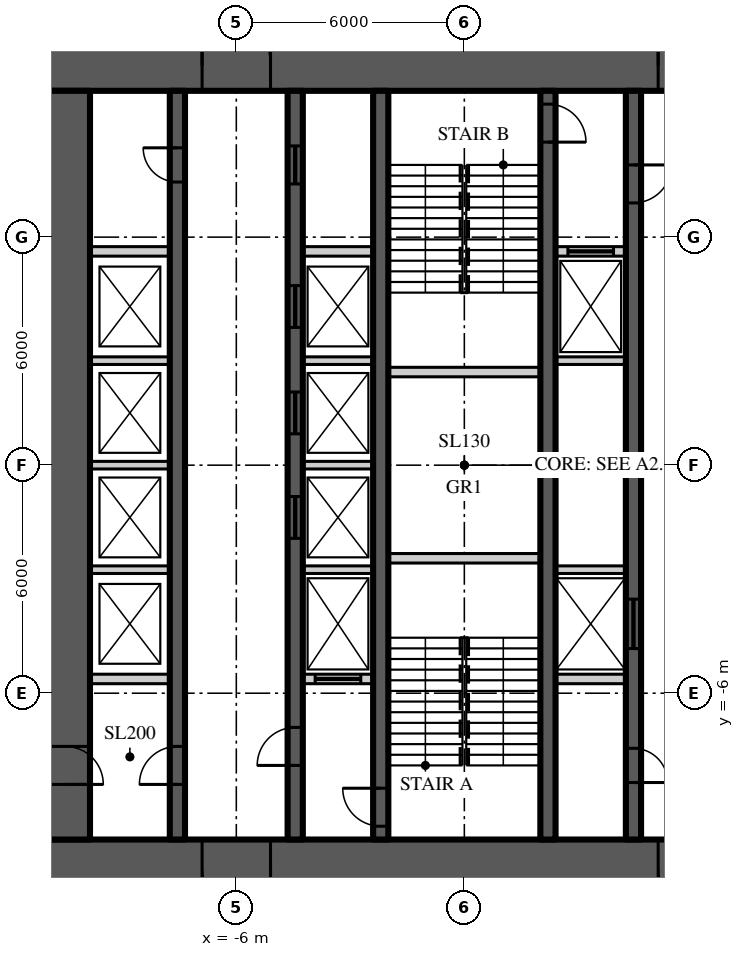
"""IFC4 building model, lengths in metres.
Left out: names, types, materials, properties, quantities, classifications, styles, units other than length and angle.
Written with IfcOpenShell. Run it as: python <this file> out.ifc"""

import sys

from ifc_helpers import new_model, si_unit, direction, frame, frame_2d, origin, place, context, subcontext, project, spatial, rectangle, extrude, element, fill, save


model = new_model("IFC4")
c1 = context("Model", 3, precision=1e-05, world=origin(), true_north=direction((0.0, 1.0)))
c2 = subcontext(c1, "Body", "Model", "MODEL_VIEW")
j1 = project(units=[si_unit("LENGTHUNIT", "METRE"), si_unit("PLANEANGLEUNIT", "RADIAN")], contexts=[c1])
p1 = place(None, origin())
s1 = spatial("IfcSite", under=j1, at=p1, CompositionType="ELEMENT")
p2 = place(p1, origin())
s2 = spatial("IfcBuilding", under=s1, at=p2, CompositionType="ELEMENT")
p3 = place(p2, frame((0.0, 0.0, 113.7)))
s3 = spatial("IfcBuildingStorey", under=s2, at=p3, CompositionType="ELEMENT", Elevation=113.7)
p4 = place(p3, frame((-11.15, 10.5, 0.0), z_axis=(0.0, 0.0, 1.0), x_axis=(1.0, 0.0, 0.0)))
e1 = element("IfcWall", 1, at=p4, inside=s3, PredefinedType="SHEAR", context=c2, shape_type="SweptSolid", body=[
    extrude(rectangle(XDim=22.3, YDim=1.3, at=frame_2d((11.15, 0.0))), origin(), (0.0, 0.0, 1.0), 4.5),
])
p5 = place(p4, frame((4.25, 0.0, 0.0)))
e2 = element("IfcOpeningElement", 2, at=p5, cuts=e1, PredefinedType="OPENING", context=c2, shape_type="SweptSolid", body=[
    extrude(rectangle(XDim=1.8, YDim=2.2, at=frame_2d((0.9, 1.1))), frame((0.0, 0.66, 0.0), z_axis=(0.0, -1.0, 0.0), x_axis=(1.0, 0.0, 0.0)), (0.0, 0.0, 1.0), 1.32),
])
p6 = place(p4, frame((16.25, 0.0, 0.0)))
e3 = element("IfcOpeningElement", 3, at=p6, cuts=e1, PredefinedType="OPENING", context=c2, shape_type="SweptSolid", body=[
    extrude(rectangle(XDim=1.8, YDim=2.2, at=frame_2d((0.9, 1.1))), frame((0.0, 0.66, 0.0), z_axis=(0.0, -1.0, 0.0), x_axis=(1.0, 0.0, 0.0)), (0.0, 0.0, 1.0), 1.32),
])
p7 = place(p3, frame((11.15, -10.5, 0.0), z_axis=(0.0, 0.0, 1.0), x_axis=(-1.0, 0.0, 0.0)))
e4 = element("IfcWall", 4, at=p7, inside=s3, PredefinedType="SHEAR", context=c2, shape_type="SweptSolid", body=[
    extrude(rectangle(XDim=22.3, YDim=1.3, at=frame_2d((11.15, 0.0))), origin(), (0.0, 0.0, 1.0), 4.5),
])
p8 = place(p7, frame((16.25, 0.0, 0.0)))
e5 = element("IfcOpeningElement", 5, at=p8, cuts=e4, PredefinedType="OPENING", context=c2, shape_type="SweptSolid", body=[
    extrude(rectangle(XDim=1.8, YDim=2.2, at=frame_2d((0.9, 1.1))), frame((0.0, 0.66, 0.0), z_axis=(0.0, -1.0, 0.0), x_axis=(1.0, 0.0, 0.0)), (0.0, 0.0, 1.0), 1.32),
])
p9 = place(p7, frame((4.25, 0.0, 0.0)))
e6 = element("IfcOpeningElement", 6, at=p9, cuts=e4, PredefinedType="OPENING", context=c2, shape_type="SweptSolid", body=[
    extrude(rectangle(XDim=1.8, YDim=2.2, at=frame_2d((0.9, 1.1))), frame((0.0, 0.66, 0.0), z_axis=(0.0, -1.0, 0.0), x_axis=(1.0, 0.0, 0.0)), (0.0, 0.0, 1.0), 1.32),
])
p10 = place(p3, frame((-10.5, 9.85, 0.0), z_axis=(0.0, 0.0, 1.0), x_axis=(0.0, -1.0, 0.0)))
e7 = element("IfcWall", 7, at=p10, inside=s3, PredefinedType="SHEAR", context=c2, shape_type="SweptSolid", body=[
    extrude(rectangle(XDim=19.7, YDim=1.3, at=frame_2d((9.85, 0.0))), origin(), (0.0, 0.0, 1.0), 4.5),
])
p11 = place(p10, frame((17.25, 0.0, 0.0)))
e8 = element("IfcOpeningElement", 8, at=p11, cuts=e7, PredefinedType="OPENING", context=c2, shape_type="SweptSolid", body=[
    extrude(rectangle(XDim=1.0, YDim=2.2, at=frame_2d((0.5, 1.1))), frame((0.0, 0.66, 0.0), z_axis=(0.0, -1.0, 0.0), x_axis=(1.0, 0.0, 0.0)), (0.0, 0.0, 1.0), 1.32),
])
p12 = place(p3, frame((-7.55, -9.85, 0.0), z_axis=(0.0, 0.0, 1.0), x_axis=(0.0, 1.0, 0.0)))
e9 = element("IfcWall", 9, at=p12, inside=s3, PredefinedType="SHEAR", context=c2, shape_type="SweptSolid", body=[
    extrude(rectangle(XDim=19.7, YDim=0.4, at=frame_2d((9.85, 0.0))), origin(), (0.0, 0.0, 1.0), 4.5),
])
p13 = place(p12, frame((1.45, 0.0, 0.0)))
e10 = element("IfcOpeningElement", 10, at=p13, cuts=e9, PredefinedType="OPENING", context=c2, shape_type="SweptSolid", body=[
    extrude(rectangle(XDim=1.0, YDim=2.2, at=frame_2d((0.5, 1.1))), frame((0.0, 0.21, 0.0), z_axis=(0.0, -1.0, 0.0), x_axis=(1.0, 0.0, 0.0)), (0.0, 0.0, 1.0), 0.42),
])
p14 = place(p12, frame((17.3, 0.0, 0.0)))
e11 = element("IfcOpeningElement", 11, at=p14, cuts=e9, PredefinedType="OPENING", context=c2, shape_type="SweptSolid", body=[
    extrude(rectangle(XDim=0.9, YDim=2.1, at=frame_2d((0.45, 1.05))), frame((0.0, 0.21, 0.0), z_axis=(0.0, -1.0, 0.0), x_axis=(1.0, 0.0, 0.0)), (0.0, 0.0, 1.0), 0.42),
])
p15 = place(p3, frame((-4.45, -9.85, 0.0), z_axis=(0.0, 0.0, 1.0), x_axis=(0.0, 1.0, 0.0)))
e12 = element("IfcWall", 12, at=p15, inside=s3, PredefinedType="SHEAR", context=c2, shape_type="SweptSolid", body=[
    extrude(rectangle(XDim=19.7, YDim=0.4, at=frame_2d((9.85, 0.0))), origin(), (0.0, 0.0, 1.0), 4.5),
])
p16 = place(p15, frame((1.95, 0.0, 0.0)))
e13 = element("IfcOpeningElement", 13, at=p16, cuts=e12, PredefinedType="OPENING", context=c2, shape_type="SweptSolid", body=[
    extrude(rectangle(XDim=1.0, YDim=2.2, at=frame_2d((0.5, 1.1))), frame((0.0, 0.21, 0.0), z_axis=(0.0, -1.0, 0.0), x_axis=(1.0, 0.0, 0.0)), (0.0, 0.0, 1.0), 0.42),
])
p17 = place(p15, frame((17.25, 0.0, 0.0)))
e14 = element("IfcOpeningElement", 14, at=p17, cuts=e12, PredefinedType="OPENING", context=c2, shape_type="SweptSolid", body=[
    extrude(rectangle(XDim=1.0, YDim=2.1, at=frame_2d((0.5, 1.05))), frame((0.0, 0.21, 0.0), z_axis=(0.0, -1.0, 0.0), x_axis=(1.0, 0.0, 0.0)), (0.0, 0.0, 1.0), 0.42),
])
p18 = place(p15, frame((7.925, 0.0, 0.0)))
e15 = element("IfcOpeningElement", 15, at=p18, cuts=e12, PredefinedType="OPENING", context=c2, shape_type="SweptSolid", body=[
    extrude(rectangle(XDim=1.1, YDim=2.2, at=frame_2d((0.55, 1.1))), frame((0.0, 0.21, 0.0), z_axis=(0.0, -1.0, 0.0), x_axis=(1.0, 0.0, 0.0)), (0.0, 0.0, 1.0), 0.42),
])
p19 = place(p15, frame((10.675, 0.0, 0.0)))
e16 = element("IfcOpeningElement", 16, at=p19, cuts=e12, PredefinedType="OPENING", context=c2, shape_type="SweptSolid", body=[
    extrude(rectangle(XDim=1.1, YDim=2.2, at=frame_2d((0.55, 1.1))), frame((0.0, 0.21, 0.0), z_axis=(0.0, -1.0, 0.0), x_axis=(1.0, 0.0, 0.0)), (0.0, 0.0, 1.0), 0.42),
])
p20 = place(p15, frame((13.475, 0.0, 0.0)))
e17 = element("IfcOpeningElement", 17, at=p20, cuts=e12, PredefinedType="OPENING", context=c2, shape_type="SweptSolid", body=[
    extrude(rectangle(XDim=1.1, YDim=2.2, at=frame_2d((0.55, 1.1))), frame((0.0, 0.21, 0.0), z_axis=(0.0, -1.0, 0.0), x_axis=(1.0, 0.0, 0.0)), (0.0, 0.0, 1.0), 0.42),
])
p21 = place(p3, frame((4.45, 9.85, 0.0), z_axis=(0.0, 0.0, 1.0), x_axis=(0.0, -1.0, 0.0)))
e18 = element("IfcWall", 18, at=p21, inside=s3, PredefinedType="SHEAR", context=c2, shape_type="SweptSolid", body=[
    extrude(rectangle(XDim=19.7, YDim=0.4, at=frame_2d((9.85, 0.0))), origin(), (0.0, 0.0, 1.0), 4.5),
])
p22 = place(p21, frame((1.95, 0.0, 0.0)))
e19 = element("IfcOpeningElement", 19, at=p22, cuts=e18, PredefinedType="OPENING", context=c2, shape_type="SweptSolid", body=[
    extrude(rectangle(XDim=1.0, YDim=2.2, at=frame_2d((0.5, 1.1))), frame((0.0, 0.21, 0.0), z_axis=(0.0, -1.0, 0.0), x_axis=(1.0, 0.0, 0.0)), (0.0, 0.0, 1.0), 0.42),
])
p23 = place(p21, frame((17.3, 0.0, 0.0)))
e20 = element("IfcOpeningElement", 20, at=p23, cuts=e18, PredefinedType="OPENING", context=c2, shape_type="SweptSolid", body=[
    extrude(rectangle(XDim=0.9, YDim=2.1, at=frame_2d((0.45, 1.05))), frame((0.0, 0.21, 0.0), z_axis=(0.0, -1.0, 0.0), x_axis=(1.0, 0.0, 0.0)), (0.0, 0.0, 1.0), 0.42),
])
p24 = place(p21, frame((13.375, 0.0, 0.0)))
e21 = element("IfcOpeningElement", 21, at=p24, cuts=e18, PredefinedType="OPENING", context=c2, shape_type="SweptSolid", body=[
    extrude(rectangle(XDim=1.3, YDim=2.2, at=frame_2d((0.65, 1.1))), frame((0.0, 0.21, 0.0), z_axis=(0.0, -1.0, 0.0), x_axis=(1.0, 0.0, 0.0)), (0.0, 0.0, 1.0), 0.42),
])
p25 = place(p3, frame((-2.2, -9.85, 0.0), z_axis=(0.0, 0.0, 1.0), x_axis=(0.0, 1.0, 0.0)))
e22 = element("IfcWall", 22, at=p25, inside=s3, PredefinedType="SHEAR", context=c2, shape_type="SweptSolid", body=[
    extrude(rectangle(XDim=19.7, YDim=0.4, at=frame_2d((9.85, 0.0))), origin(), (0.0, 0.0, 1.0), 4.5),
])
p26 = place(p25, frame((0.35, 0.0, 0.0)))
e23 = element("IfcOpeningElement", 23, at=p26, cuts=e22, PredefinedType="OPENING", context=c2, shape_type="SweptSolid", body=[
    extrude(rectangle(XDim=1.0, YDim=2.2, at=frame_2d((0.5, 1.1))), frame((0.0, 0.21, 0.0), z_axis=(0.0, -1.0, 0.0), x_axis=(1.0, 0.0, 0.0)), (0.0, 0.0, 1.0), 0.42),
])
p27 = place(p3, frame((2.2, 9.85, 0.0), z_axis=(0.0, 0.0, 1.0), x_axis=(0.0, -1.0, 0.0)))
e24 = element("IfcWall", 24, at=p27, inside=s3, PredefinedType="SHEAR", context=c2, shape_type="SweptSolid", body=[
    extrude(rectangle(XDim=19.7, YDim=0.4, at=frame_2d((9.85, 0.0))), origin(), (0.0, 0.0, 1.0), 4.5),
])
p28 = place(p27, frame((0.35, 0.0, 0.0)))
e25 = element("IfcOpeningElement", 25, at=p28, cuts=e24, PredefinedType="OPENING", context=c2, shape_type="SweptSolid", body=[
    extrude(rectangle(XDim=1.0, YDim=2.2, at=frame_2d((0.5, 1.1))), frame((0.0, 0.21, 0.0), z_axis=(0.0, -1.0, 0.0), x_axis=(1.0, 0.0, 0.0)), (0.0, 0.0, 1.0), 0.42),
])
p29 = place(p3, frame((-9.85, 5.625, 0.0), z_axis=(0.0, 0.0, 1.0), x_axis=(1.0, 0.0, 0.0)))
e26 = element("IfcWall", 26, at=p29, inside=s3, PredefinedType="SOLIDWALL", context=c2, shape_type="SweptSolid", body=[
    extrude(rectangle(XDim=2.1, YDim=0.25, at=frame_2d((1.05, 0.0))), origin(), (0.0, 0.0, 1.0), 4.3),
])
p30 = place(p3, frame((-4.25, 5.625, 0.0), z_axis=(0.0, 0.0, 1.0), x_axis=(1.0, 0.0, 0.0)))
e27 = element("IfcWall", 27, at=p30, inside=s3, PredefinedType="SOLIDWALL", context=c2, shape_type="SweptSolid", body=[
    extrude(rectangle(XDim=1.85, YDim=0.25, at=frame_2d((0.925, 0.0))), origin(), (0.0, 0.0, 1.0), 4.3),
])
p31 = place(p3, frame((2.4, 5.625, 0.0), z_axis=(0.0, 0.0, 1.0), x_axis=(1.0, 0.0, 0.0)))
e28 = element("IfcWall", 28, at=p31, inside=s3, PredefinedType="SOLIDWALL", context=c2, shape_type="SweptSolid", body=[
    extrude(rectangle(XDim=1.85, YDim=0.25, at=frame_2d((0.925, 0.0))), origin(), (0.0, 0.0, 1.0), 4.3),
])
p32 = place(p31, frame((0.325, 0.0, 0.0)))
e29 = element("IfcOpeningElement", 29, at=p32, cuts=e28, PredefinedType="OPENING", context=c2, shape_type="SweptSolid", body=[
    extrude(rectangle(XDim=1.2, YDim=2.2, at=frame_2d((0.6, 1.1))), frame((0.0, 0.135, 0.0), z_axis=(0.0, -1.0, 0.0), x_axis=(1.0, 0.0, 0.0)), (0.0, 0.0, 1.0), 0.27),
])
p33 = place(p3, frame((-9.85, -5.625, 0.0), z_axis=(0.0, 0.0, 1.0), x_axis=(1.0, 0.0, 0.0)))
e30 = element("IfcWall", 30, at=p33, inside=s3, PredefinedType="SOLIDWALL", context=c2, shape_type="SweptSolid", body=[
    extrude(rectangle(XDim=2.1, YDim=0.25, at=frame_2d((1.05, 0.0))), origin(), (0.0, 0.0, 1.0), 4.3),
])
p34 = place(p3, frame((-4.25, -5.625, 0.0), z_axis=(0.0, 0.0, 1.0), x_axis=(1.0, 0.0, 0.0)))
e31 = element("IfcWall", 31, at=p34, inside=s3, PredefinedType="SOLIDWALL", context=c2, shape_type="SweptSolid", body=[
    extrude(rectangle(XDim=1.85, YDim=0.25, at=frame_2d((0.925, 0.0))), origin(), (0.0, 0.0, 1.0), 4.3),
])
p35 = place(p34, frame((0.325, 0.0, 0.0)))
e32 = element("IfcOpeningElement", 32, at=p35, cuts=e31, PredefinedType="OPENING", context=c2, shape_type="SweptSolid", body=[
    extrude(rectangle(XDim=1.2, YDim=2.2, at=frame_2d((0.6, 1.1))), frame((0.0, 0.135, 0.0), z_axis=(0.0, -1.0, 0.0), x_axis=(1.0, 0.0, 0.0)), (0.0, 0.0, 1.0), 0.27),
])
p36 = place(p3, frame((2.4, -5.625, 0.0), z_axis=(0.0, 0.0, 1.0), x_axis=(1.0, 0.0, 0.0)))
e33 = element("IfcWall", 33, at=p36, inside=s3, PredefinedType="SOLIDWALL", context=c2, shape_type="SweptSolid", body=[
    extrude(rectangle(XDim=1.85, YDim=0.25, at=frame_2d((0.925, 0.0))), origin(), (0.0, 0.0, 1.0), 4.3),
])
for number, where, z_axis, x_axis in (
    (34, (-2.0, -2.45, 0.0), (0.0, 0.0, 1.0), (1.0, 0.0, 0.0)),
    (35, (-2.0, 2.45, 0.0), (0.0, 0.0, 1.0), (1.0, 0.0, 0.0)),
):
    element("IfcWall", number, at=place(p3, frame(where, z_axis=z_axis, x_axis=x_axis)), inside=s3, PredefinedType="SOLIDWALL", context=c2, shape_type="SweptSolid", body=[
        extrude(rectangle(XDim=4.0, YDim=0.25, at=frame_2d((2.0, 0.0))), origin(), (0.0, 0.0, 1.0), 4.3),
    ])
p37 = place(p3, frame((-9.85, -2.75, 0.0), z_axis=(0.0, 0.0, 1.0), x_axis=(1.0, 0.0, 0.0)))
e36 = element("IfcWall", 36, at=p37, inside=s3, PredefinedType="SOLIDWALL", context=c2, shape_type="SweptSolid", body=[
    extrude(rectangle(XDim=2.1, YDim=0.2, at=frame_2d((1.05, 0.0))), origin(), (0.0, 0.0, 1.0), 4.3),
])
for number, where, z_axis, x_axis in (
    (37, (-4.25, -2.75, 0.0), (0.0, 0.0, 1.0), (1.0, 0.0, 0.0)),
    (38, (2.4, -2.75, 0.0), (0.0, 0.0, 1.0), (1.0, 0.0, 0.0)),
):
    element("IfcWall", number, at=place(p3, frame(where, z_axis=z_axis, x_axis=x_axis)), inside=s3, PredefinedType="SOLIDWALL", context=c2, shape_type="SweptSolid", body=[
        extrude(rectangle(XDim=1.85, YDim=0.2, at=frame_2d((0.925, 0.0))), origin(), (0.0, 0.0, 1.0), 4.3),
    ])
p38 = place(p3, frame((-9.85, 0.0, 0.0), z_axis=(0.0, 0.0, 1.0), x_axis=(1.0, 0.0, 0.0)))
e39 = element("IfcWall", 39, at=p38, inside=s3, PredefinedType="SOLIDWALL", context=c2, shape_type="SweptSolid", body=[
    extrude(rectangle(XDim=2.1, YDim=0.2, at=frame_2d((1.05, 0.0))), origin(), (0.0, 0.0, 1.0), 4.3),
])
p39 = place(p3, frame((-4.25, 0.0, 0.0), z_axis=(0.0, 0.0, 1.0), x_axis=(1.0, 0.0, 0.0)))
e40 = element("IfcWall", 40, at=p39, inside=s3, PredefinedType="SOLIDWALL", context=c2, shape_type="SweptSolid", body=[
    extrude(rectangle(XDim=1.85, YDim=0.2, at=frame_2d((0.925, 0.0))), origin(), (0.0, 0.0, 1.0), 4.3),
])
p40 = place(p3, frame((-9.85, 2.75, 0.0), z_axis=(0.0, 0.0, 1.0), x_axis=(1.0, 0.0, 0.0)))
e41 = element("IfcWall", 41, at=p40, inside=s3, PredefinedType="SOLIDWALL", context=c2, shape_type="SweptSolid", body=[
    extrude(rectangle(XDim=2.1, YDim=0.2, at=frame_2d((1.05, 0.0))), origin(), (0.0, 0.0, 1.0), 4.3),
])
for number, where, z_axis, x_axis in (
    (42, (-4.25, 2.75, 0.0), (0.0, 0.0, 1.0), (1.0, 0.0, 0.0)),
    (43, (2.4, 2.75, 0.0), (0.0, 0.0, 1.0), (1.0, 0.0, 0.0)),
):
    element("IfcWall", number, at=place(p3, frame(where, z_axis=z_axis, x_axis=x_axis)), inside=s3, PredefinedType="SOLIDWALL", context=c2, shape_type="SweptSolid", body=[
        extrude(rectangle(XDim=1.85, YDim=0.2, at=frame_2d((0.925, 0.0))), origin(), (0.0, 0.0, 1.0), 4.3),
    ])
p41 = place(p5, origin())
e44 = element("IfcDoor", 44, at=p41, inside=s3, OperationType="DOUBLE_DOOR_DOUBLE_SWING", PredefinedType="DOOR", context=c2, shape_type="SweptSolid", body=[
    extrude(rectangle(XDim=1.8, YDim=2.2, at=frame_2d((0.9, 1.1))), frame((0.0, 0.025, 0.0), z_axis=(0.0, -1.0, 0.0), x_axis=(1.0, 0.0, 0.0)), (0.0, 0.0, 1.0), 0.05),
])
fill(e2, e44)
p42 = place(p8, origin())
e45 = element("IfcDoor", 45, at=p42, inside=s3, OperationType="DOUBLE_DOOR_DOUBLE_SWING", PredefinedType="DOOR", context=c2, shape_type="SweptSolid", body=[
    extrude(rectangle(XDim=1.8, YDim=2.2, at=frame_2d((0.9, 1.1))), frame((0.0, 0.025, 0.0), z_axis=(0.0, -1.0, 0.0), x_axis=(1.0, 0.0, 0.0)), (0.0, 0.0, 1.0), 0.05),
])
fill(e5, e45)
p43 = place(p6, origin())
e46 = element("IfcDoor", 46, at=p43, inside=s3, OperationType="DOUBLE_DOOR_DOUBLE_SWING", PredefinedType="DOOR", context=c2, shape_type="SweptSolid", body=[
    extrude(rectangle(XDim=1.8, YDim=2.2, at=frame_2d((0.9, 1.1))), frame((0.0, 0.025, 0.0), z_axis=(0.0, -1.0, 0.0), x_axis=(1.0, 0.0, 0.0)), (0.0, 0.0, 1.0), 0.05),
])
fill(e3, e46)
p44 = place(p9, origin())
e47 = element("IfcDoor", 47, at=p44, inside=s3, OperationType="DOUBLE_DOOR_DOUBLE_SWING", PredefinedType="DOOR", context=c2, shape_type="SweptSolid", body=[
    extrude(rectangle(XDim=1.8, YDim=2.2, at=frame_2d((0.9, 1.1))), frame((0.0, 0.025, 0.0), z_axis=(0.0, -1.0, 0.0), x_axis=(1.0, 0.0, 0.0)), (0.0, 0.0, 1.0), 0.05),
])
fill(e6, e47)
p45 = place(p13, origin())
e48 = element("IfcDoor", 48, at=p45, inside=s3, OperationType="SINGLE_SWING_LEFT", PredefinedType="DOOR", context=c2, shape_type="SweptSolid", body=[
    extrude(rectangle(XDim=1.0, YDim=2.2, at=frame_2d((0.5, 1.1))), frame((0.0, 0.025, 0.0), z_axis=(0.0, -1.0, 0.0), x_axis=(1.0, 0.0, 0.0)), (0.0, 0.0, 1.0), 0.05),
])
fill(e10, e48)
p46 = place(p11, origin())
e49 = element("IfcDoor", 49, at=p46, inside=s3, OperationType="SINGLE_SWING_RIGHT", PredefinedType="DOOR", context=c2, shape_type="SweptSolid", body=[
    extrude(rectangle(XDim=1.0, YDim=2.2, at=frame_2d((0.5, 1.1))), frame((0.0, 0.025, 0.0), z_axis=(0.0, -1.0, 0.0), x_axis=(1.0, 0.0, 0.0)), (0.0, 0.0, 1.0), 0.05),
])
fill(e8, e49)
p47 = place(p16, origin())
e50 = element("IfcDoor", 50, at=p47, inside=s3, OperationType="SINGLE_SWING_LEFT", PredefinedType="DOOR", context=c2, shape_type="SweptSolid", body=[
    extrude(rectangle(XDim=1.0, YDim=2.2, at=frame_2d((0.5, 1.1))), frame((0.0, 0.025, 0.0), z_axis=(0.0, -1.0, 0.0), x_axis=(1.0, 0.0, 0.0)), (0.0, 0.0, 1.0), 0.05),
])
fill(e13, e50)
p48 = place(p26, origin())
e51 = element("IfcDoor", 51, at=p48, inside=s3, OperationType="SINGLE_SWING_RIGHT", PredefinedType="DOOR", context=c2, shape_type="SweptSolid", body=[
    extrude(rectangle(XDim=1.0, YDim=2.2, at=frame_2d((0.5, 1.1))), frame((0.0, 0.025, 0.0), z_axis=(0.0, -1.0, 0.0), x_axis=(1.0, 0.0, 0.0)), (0.0, 0.0, 1.0), 0.05),
])
fill(e23, e51)
p49 = place(p22, origin())
e52 = element("IfcDoor", 52, at=p49, inside=s3, OperationType="SINGLE_SWING_LEFT", PredefinedType="DOOR", context=c2, shape_type="SweptSolid", body=[
    extrude(rectangle(XDim=1.0, YDim=2.2, at=frame_2d((0.5, 1.1))), frame((0.0, 0.025, 0.0), z_axis=(0.0, -1.0, 0.0), x_axis=(1.0, 0.0, 0.0)), (0.0, 0.0, 1.0), 0.05),
])
fill(e19, e52)
p50 = place(p28, origin())
e53 = element("IfcDoor", 53, at=p50, inside=s3, OperationType="SINGLE_SWING_RIGHT", PredefinedType="DOOR", context=c2, shape_type="SweptSolid", body=[
    extrude(rectangle(XDim=1.0, YDim=2.2, at=frame_2d((0.5, 1.1))), frame((0.0, 0.025, 0.0), z_axis=(0.0, -1.0, 0.0), x_axis=(1.0, 0.0, 0.0)), (0.0, 0.0, 1.0), 0.05),
])
fill(e25, e53)
p51 = place(p14, origin())
e54 = element("IfcDoor", 54, at=p51, inside=s3, OperationType="SINGLE_SWING_RIGHT", PredefinedType="DOOR", context=c2, shape_type="SweptSolid", body=[
    extrude(rectangle(XDim=0.9, YDim=2.1, at=frame_2d((0.45, 1.05))), frame((0.0, 0.025, 0.0), z_axis=(0.0, -1.0, 0.0), x_axis=(1.0, 0.0, 0.0)), (0.0, 0.0, 1.0), 0.05),
])
fill(e11, e54)
p52 = place(p17, origin())
e55 = element("IfcDoor", 55, at=p52, inside=s3, OperationType="SLIDING_TO_LEFT", PredefinedType="DOOR", context=c2, shape_type="SweptSolid", body=[
    extrude(rectangle(XDim=1.0, YDim=2.1, at=frame_2d((0.5, 1.05))), frame((0.0, 0.025, 0.0), z_axis=(0.0, -1.0, 0.0), x_axis=(1.0, 0.0, 0.0)), (0.0, 0.0, 1.0), 0.05),
])
fill(e14, e55)
p53 = place(p23, origin())
e56 = element("IfcDoor", 56, at=p53, inside=s3, OperationType="SINGLE_SWING_RIGHT", PredefinedType="DOOR", context=c2, shape_type="SweptSolid", body=[
    extrude(rectangle(XDim=0.9, YDim=2.1, at=frame_2d((0.45, 1.05))), frame((0.0, 0.025, 0.0), z_axis=(0.0, -1.0, 0.0), x_axis=(1.0, 0.0, 0.0)), (0.0, 0.0, 1.0), 0.05),
])
fill(e20, e56)
p54 = place(p18, origin())
e57 = element("IfcDoor", 57, at=p54, inside=s3, OperationType="SLIDING_TO_LEFT", PredefinedType="DOOR", context=c2, shape_type="SweptSolid", body=[
    extrude(rectangle(XDim=1.1, YDim=2.2, at=frame_2d((0.55, 1.1))), frame((0.0, 0.025, 0.0), z_axis=(0.0, -1.0, 0.0), x_axis=(1.0, 0.0, 0.0)), (0.0, 0.0, 1.0), 0.05),
])
fill(e15, e57)
p55 = place(p19, origin())
e58 = element("IfcDoor", 58, at=p55, inside=s3, OperationType="SLIDING_TO_LEFT", PredefinedType="DOOR", context=c2, shape_type="SweptSolid", body=[
    extrude(rectangle(XDim=1.1, YDim=2.2, at=frame_2d((0.55, 1.1))), frame((0.0, 0.025, 0.0), z_axis=(0.0, -1.0, 0.0), x_axis=(1.0, 0.0, 0.0)), (0.0, 0.0, 1.0), 0.05),
])
fill(e16, e58)
p56 = place(p20, origin())
e59 = element("IfcDoor", 59, at=p56, inside=s3, OperationType="SLIDING_TO_LEFT", PredefinedType="DOOR", context=c2, shape_type="SweptSolid", body=[
    extrude(rectangle(XDim=1.1, YDim=2.2, at=frame_2d((0.55, 1.1))), frame((0.0, 0.025, 0.0), z_axis=(0.0, -1.0, 0.0), x_axis=(1.0, 0.0, 0.0)), (0.0, 0.0, 1.0), 0.05),
])
fill(e17, e59)
p57 = place(p24, origin())
e60 = element("IfcDoor", 60, at=p57, inside=s3, OperationType="SLIDING_TO_LEFT", PredefinedType="DOOR", context=c2, shape_type="SweptSolid", body=[
    extrude(rectangle(XDim=1.3, YDim=2.2, at=frame_2d((0.65, 1.1))), frame((0.0, 0.025, 0.0), z_axis=(0.0, -1.0, 0.0), x_axis=(1.0, 0.0, 0.0)), (0.0, 0.0, 1.0), 0.05),
])
fill(e21, e60)
p58 = place(p35, origin())
e61 = element("IfcDoor", 61, at=p58, inside=s3, OperationType="SLIDING_TO_LEFT", PredefinedType="DOOR", context=c2, shape_type="SweptSolid", body=[
    extrude(rectangle(XDim=1.2, YDim=2.2, at=frame_2d((0.6, 1.1))), frame((0.0, 0.025, 0.0), z_axis=(0.0, -1.0, 0.0), x_axis=(1.0, 0.0, 0.0)), (0.0, 0.0, 1.0), 0.05),
])
fill(e32, e61)
p59 = place(p32, origin())
e62 = element("IfcDoor", 62, at=p59, inside=s3, OperationType="SLIDING_TO_LEFT", PredefinedType="DOOR", context=c2, shape_type="SweptSolid", body=[
    extrude(rectangle(XDim=1.2, YDim=2.2, at=frame_2d((0.6, 1.1))), frame((0.0, 0.025, 0.0), z_axis=(0.0, -1.0, 0.0), x_axis=(1.0, 0.0, 0.0)), (0.0, 0.0, 1.0), 0.05),
])
fill(e29, e62)
save(model, sys.argv[1])
